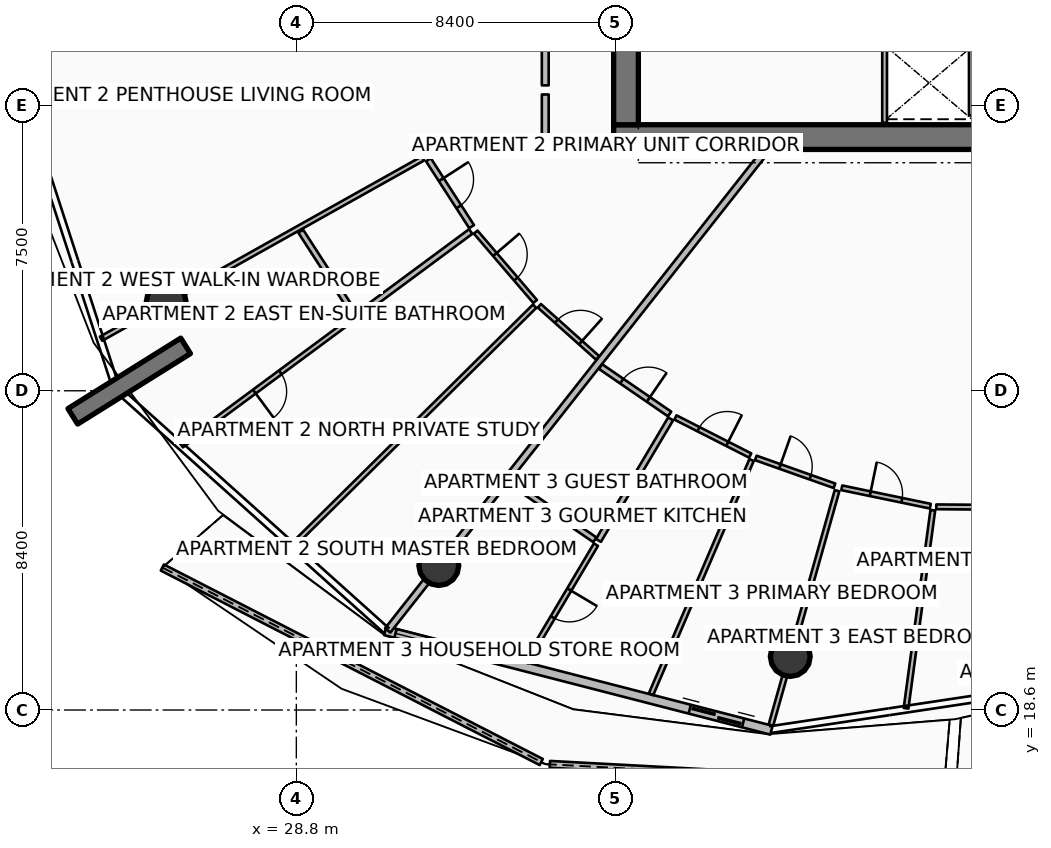
"""IFC4 building model, lengths in metres.
Left out: names, types, materials, properties, quantities, classifications, styles, units other than length and angle.
Written with IfcOpenShell. Run it as: python <this file> out.ifc"""

import sys

from ifc_helpers import new_model, si_unit, direction, frame, frame_2d, origin, origin_2d, place, context, subcontext, project, spatial, polyline, rectangle, circle, outline, extrude, element, fill, save


model = new_model("IFC4")
c1 = context("Model", 3, precision=1e-05, world=origin(), true_north=direction((0.0, 1.0)))
c2 = subcontext(c1, "Body", "Model", "MODEL_VIEW")
j1 = project(units=[si_unit("LENGTHUNIT", "METRE"), si_unit("PLANEANGLEUNIT", "RADIAN")], contexts=[c1])
p1 = place(None, origin())
s1 = spatial("IfcSite", under=j1, at=p1, CompositionType="ELEMENT")
p2 = place(p1, origin())
s2 = spatial("IfcBuilding", under=s1, at=p2, CompositionType="ELEMENT")
p3 = place(p2, frame((0.0, 0.0, 221.55)))
s3 = spatial("IfcBuildingStorey", under=s2, at=p3, CompositionType="ELEMENT", Elevation=221.55)
p4 = place(p3, frame((37.15, 33.675, 0.0), z_axis=(0.0, 0.0, 1.0), x_axis=(1.0, 0.0, 0.0)))
e1 = element("IfcWall", 1, at=p4, inside=s3, PredefinedType="SHEAR", context=c2, shape_type="SweptSolid", body=[
    extrude(rectangle(XDim=9.75, YDim=0.65, at=frame_2d((4.875, 0.0))), origin(), (0.0, 0.0, 1.0), 3.75),
])
p5 = place(p3, frame((37.475, 34.0, 0.0), z_axis=(0.0, 0.0, 1.0), x_axis=(0.0, 1.0, 0.0)))
e2 = element("IfcWall", 2, at=p5, inside=s3, PredefinedType="SHEAR", context=c2, shape_type="SweptSolid", body=[
    extrude(rectangle(XDim=16.0, YDim=0.65, at=frame_2d((8.0, 0.0))), origin(), (0.0, 0.0, 1.0), 3.75),
])
p6 = place(p3, frame((25.886, 28.182, 0.0), z_axis=(0.0, 0.0, 1.0), x_axis=(-0.848033572426, -0.529942506352, 0.0)))
e3 = element("IfcWall", 3, at=p6, inside=s3, PredefinedType="SOLIDWALL", context=c2, shape_type="SweptSolid", body=[
    extrude(rectangle(XDim=3.5, YDim=0.48, at=frame_2d((1.75, 0.0))), origin(), (0.0, 0.0, 1.0), 3.75),
])
p7 = place(p3, frame((25.375, 29.329, 0.0), z_axis=(-0.260291589726, -0.145725683619, 0.954469650356), x_axis=(0.488507395799, -0.872559753971, 0.0)))
e4 = element("IfcColumn", 4, at=p7, inside=s3, PredefinedType="COLUMN", context=c2, shape_type="SweptSolid", body=[
    extrude(circle(Radius=0.525, at=origin_2d()), origin(), (0.0, 0.0, 1.0), 3.635),
])
p8 = place(p3, frame((32.549, 22.401, 0.0), z_axis=(-0.178277097361, -0.226248863544, 0.957616169612), x_axis=(0.785457214564, -0.618915958826, 0.0)))
e5 = element("IfcColumn", 5, at=p8, inside=s3, PredefinedType="COLUMN", context=c2, shape_type="SweptSolid", body=[
    extrude(circle(Radius=0.525, at=origin_2d()), origin(), (0.0, 0.0, 1.0), 3.624),
])
p9 = place(p3, frame((41.798, 20.008, 0.0), z_axis=(-0.072038916576, -0.255527870756, 0.964114050186), x_axis=(0.962482190553, -0.271344859667, 0.0)))
e6 = element("IfcColumn", 6, at=p9, inside=s3, PredefinedType="COLUMN", context=c2, shape_type="SweptSolid", body=[
    extrude(circle(Radius=0.525, at=origin_2d()), origin(), (0.0, 0.0, 1.0), 3.599),
])
p10 = place(p3, frame((25.274, 22.349, 0.0), z_axis=(0.0, 0.0, 1.0), x_axis=(0.889659107665, -0.456625308266, 0.0)))
e7 = element("IfcWall", 7, at=p10, inside=s3, PredefinedType="PARAPET", context=c2, shape_type="SweptSolid", body=[
    extrude(outline(polyline([(0.0, 0.0), (11.208, 0.0), (11.208, 1.148), (5.604, 1.284), (0.0, 1.483), (0.0, 0.0)])), frame((0.0, 0.09, 0.0), z_axis=(0.0, -1.0, 0.0), x_axis=(1.0, 0.0, 0.0)), (0.0, 0.0, 1.0), 0.18),
])
p11 = place(p3, frame((35.472, 17.17, 0.0), z_axis=(0.0, 0.0, 1.0), x_axis=(0.998572477619, -0.053413546421, 0.0)))
e8 = element("IfcWall", 8, at=p11, inside=s3, PredefinedType="PARAPET", context=c2, shape_type="SweptSolid", body=[
    extrude(outline(polyline([(0.0, 0.0), (10.389, 0.0), (10.389, 1.224), (5.195, 1.127), (0.0, 1.148), (0.0, 0.0)])), frame((0.0, 0.09, 0.0), z_axis=(0.0, -1.0, 0.0), x_axis=(1.0, 0.0, 0.0)), (0.0, 0.0, 1.0), 0.18),
])
p12 = place(p3, frame((46.161, 16.649, 0.0), z_axis=(0.0, 0.0, 1.0), x_axis=(0.981918699124, 0.189303112259, 0.0)))
e9 = element("IfcWall", 9, at=p12, inside=s3, PredefinedType="PARAPET", context=c2, shape_type="SweptSolid", body=[
    extrude(outline(polyline([(0.0, 0.0), (9.537, 0.0), (9.537, 1.632), (4.769, 1.418), (0.0, 1.233), (0.0, 0.0)])), frame((0.0, 0.09, 0.0), z_axis=(0.0, -1.0, 0.0), x_axis=(1.0, 0.0, 0.0)), (0.0, 0.0, 1.0), 0.18),
])
p13 = place(p3, frame((31.14, 20.687, 0.0), z_axis=(0.0, 0.0, 1.0), x_axis=(0.968374028006, -0.249502989727, 0.0)))
e10 = element("IfcWall", 10, at=p13, inside=s3, PredefinedType="SOLIDWALL", context=c2, shape_type="SweptSolid", body=[
    extrude(rectangle(XDim=10.494, YDim=0.24, at=frame_2d((5.247, 0.0))), origin(), (0.0, 0.0, 1.0), 2.42),
])
p14 = place(p13, frame((8.274, 0.0, 0.0)))
e11 = element("IfcOpeningElement", 11, at=p14, cuts=e10, PredefinedType="OPENING", context=c2, shape_type="SweptSolid", body=[
    extrude(rectangle(XDim=1.45, YDim=2.15, at=frame_2d((0.725, 1.075))), frame((0.0, 0.13, 0.0), z_axis=(0.0, -1.0, 0.0), x_axis=(1.0, 0.0, 0.0)), (0.0, 0.0, 1.0), 0.26),
])
p15 = place(p13, frame((0.28, 0.0, 0.65)))
e12 = element("IfcOpeningElement", 12, at=p15, cuts=e10, PredefinedType="OPENING", context=c2, shape_type="SweptSolid", body=[
    extrude(rectangle(XDim=1.6, YDim=1.5, at=frame_2d((0.8, 0.75))), frame((0.0, 0.13, 0.0), z_axis=(0.0, -1.0, 0.0), x_axis=(1.0, 0.0, 0.0)), (0.0, 0.0, 1.0), 0.26),
])
p16 = place(p3, frame((46.58, 34.245, 0.0), z_axis=(0.0, 0.0, 1.0), x_axis=(0.0, 1.0, 0.0)))
e13 = element("IfcWall", 13, at=p16, inside=s3, PredefinedType="PARTITIONING", context=c2, shape_type="SweptSolid", body=[
    extrude(rectangle(XDim=1.71, YDim=0.16, at=frame_2d((0.855, 0.0))), origin(), (0.0, 0.0, 1.0), 3.47),
])
p17 = place(p3, frame((44.28, 34.05, 0.0), z_axis=(0.0, 0.0, 1.0), x_axis=(0.0, 1.0, 0.0)))
e14 = element("IfcWall", 14, at=p17, inside=s3, PredefinedType="PARTITIONING", context=c2, shape_type="SweptSolid", body=[
    extrude(rectangle(XDim=2.03, YDim=0.125, at=frame_2d((1.015, 0.0))), origin(), (0.0, 0.0, 1.0), 2.91),
])
p18 = place(p3, frame((41.113, 33.264, 0.0), z_axis=(0.0, 0.0, 1.0), x_axis=(-0.619089233189, -0.785320648748, 0.0)))
e15 = element("IfcWall", 15, at=p18, inside=s3, PredefinedType="PARTITIONING", context=c2, shape_type="SweptSolid", body=[
    extrude(rectangle(XDim=16.006, YDim=0.18, at=frame_2d((8.003, 0.0))), origin(), (0.0, 0.0, 1.0), 2.427),
])
p19 = place(p3, frame((35.35, 40.383, 0.0), z_axis=(0.0, 0.0, 1.0), x_axis=(0.0, -1.0, 0.0)))
e16 = element("IfcWall", 16, at=p19, inside=s3, PredefinedType="PARTITIONING", context=c2, shape_type="SweptSolid", body=[
    extrude(rectangle(XDim=5.347, YDim=0.18, at=frame_2d((2.674, 0.0))), origin(), (0.0, 0.0, 1.0), 2.427),
])
p20 = place(p19, frame((2.124, 0.0, 0.0)))
e17 = element("IfcOpeningElement", 17, at=p20, cuts=e16, PredefinedType="OPENING", context=c2, shape_type="SweptSolid", body=[
    extrude(rectangle(XDim=1.1, YDim=2.1, at=frame_2d((0.55, 1.05))), frame((0.0, 0.1, 0.0), z_axis=(0.0, -1.0, 0.0), x_axis=(1.0, 0.0, 0.0)), (0.0, 0.0, 1.0), 0.2),
])
p21 = place(p3, frame((35.35, 34.796, 0.0), z_axis=(0.0, 0.0, 1.0), x_axis=(0.0, -1.0, 0.0)))
e18 = element("IfcWall", 18, at=p21, inside=s3, PredefinedType="PARTITIONING", context=c2, shape_type="SweptSolid", body=[
    extrude(rectangle(XDim=1.326, YDim=0.18, at=frame_2d((0.663, 0.0))), origin(), (0.0, 0.0, 1.0), 2.427),
])
p22 = place(p3, frame((32.134, 33.115, 0.0), z_axis=(0.0, 0.0, 1.0), x_axis=(-0.872496583505, -0.488620212202, 0.0)))
e19 = element("IfcWall", 19, at=p22, inside=s3, PredefinedType="PARTITIONING", context=c2, shape_type="SweptSolid", body=[
    extrude(rectangle(XDim=9.71, YDim=0.125, at=frame_2d((4.855, 0.0))), origin(), (0.0, 0.0, 1.0), 2.427),
])
p23 = place(p3, frame((32.275, 33.079, 0.0), z_axis=(0.0, 0.0, 1.0), x_axis=(0.542840570976, -0.839835766387, 0.0)))
e20 = element("IfcWall", 20, at=p23, inside=s3, PredefinedType="PARTITIONING", context=c2, shape_type="SweptSolid", body=[
    extrude(rectangle(XDim=2.095, YDim=0.15, at=frame_2d((1.048, 0.0))), origin(), (0.0, 0.0, 1.0), 2.427),
])
p24 = place(p23, frame((0.623, 0.0, 0.0)))
e21 = element("IfcOpeningElement", 21, at=p24, cuts=e20, PredefinedType="OPENING", context=c2, shape_type="SweptSolid", body=[
    extrude(rectangle(XDim=0.85, YDim=2.06, at=frame_2d((0.425, 1.03))), frame((0.0, 0.085, 0.0), z_axis=(0.0, -1.0, 0.0), x_axis=(1.0, 0.0, 0.0)), (0.0, 0.0, 1.0), 0.17),
])
p25 = place(p3, frame((28.916, 31.198, 0.0), z_axis=(0.0, 0.0, 1.0), x_axis=(0.542815965197, -0.839851670194, 0.0)))
e22 = element("IfcWall", 22, at=p25, inside=s3, PredefinedType="PARTITIONING", context=c2, shape_type="SweptSolid", body=[
    extrude(rectangle(XDim=2.582, YDim=0.15, at=frame_2d((1.291, 0.0))), origin(), (0.0, 0.0, 1.0), 2.427),
])
p26 = place(p3, frame((33.389, 31.19, 0.0), z_axis=(0.0, 0.0, 1.0), x_axis=(-0.803881437267, -0.59478957188, 0.0)))
e23 = element("IfcWall", 23, at=p26, inside=s3, PredefinedType="PARTITIONING", context=c2, shape_type="SweptSolid", body=[
    extrude(rectangle(XDim=3.72, YDim=0.15, at=frame_2d((1.86, 0.0))), origin(), (0.0, 0.0, 1.0), 2.91),
])
p27 = place(p3, frame((30.294, 28.901, 0.0), z_axis=(0.0, 0.0, 1.0), x_axis=(-0.803900511417, -0.594763791554, 0.0)))
e24 = element("IfcWall", 24, at=p27, inside=s3, PredefinedType="PARTITIONING", context=c2, shape_type="SweptSolid", body=[
    extrude(rectangle(XDim=5.616, YDim=0.125, at=frame_2d((2.808, 0.0))), origin(), (0.0, 0.0, 1.0), 2.445),
])
p28 = place(p27, frame((2.383, 0.0, 0.0)))
e25 = element("IfcOpeningElement", 25, at=p28, cuts=e24, PredefinedType="OPENING", context=c2, shape_type="SweptSolid", body=[
    extrude(rectangle(XDim=0.85, YDim=2.06, at=frame_2d((0.425, 1.03))), frame((0.0, 0.073, 0.0), z_axis=(0.0, -1.0, 0.0), x_axis=(1.0, 0.0, 0.0)), (0.0, 0.0, 1.0), 0.145),
])
p29 = place(p3, frame((35.072, 29.226, 0.0), z_axis=(0.0, 0.0, 1.0), x_axis=(-0.711336156962, -0.702851955819, 0.0)))
e26 = element("IfcWall", 26, at=p29, inside=s3, PredefinedType="PARTITIONING", context=c2, shape_type="SweptSolid", body=[
    extrude(rectangle(XDim=8.949, YDim=0.125, at=frame_2d((4.475, 0.0))), origin(), (0.0, 0.0, 1.0), 2.445),
])
p30 = place(p3, frame((33.52, 31.176, 0.0), z_axis=(0.0, 0.0, 1.0), x_axis=(0.650465139948, -0.759536109551, 0.0)))
e27 = element("IfcWall", 27, at=p30, inside=s3, PredefinedType="PARTITIONING", context=c2, shape_type="SweptSolid", body=[
    extrude(rectangle(XDim=2.404, YDim=0.125, at=frame_2d((1.202, 0.0))), origin(), (0.0, 0.0, 1.0), 2.91),
])
p31 = place(p30, frame((0.777, 0.0, 0.0)))
e28 = element("IfcOpeningElement", 28, at=p31, cuts=e27, PredefinedType="OPENING", context=c2, shape_type="SweptSolid", body=[
    extrude(rectangle(XDim=0.85, YDim=2.06, at=frame_2d((0.425, 1.03))), frame((0.0, 0.073, 0.0), z_axis=(0.0, -1.0, 0.0), x_axis=(1.0, 0.0, 0.0)), (0.0, 0.0, 1.0), 0.145),
])
p32 = place(p3, frame((35.195, 29.236, 0.0), z_axis=(0.0, 0.0, 1.0), x_axis=(0.745455386239, -0.666555524414, 0.0)))
e29 = element("IfcWall", 29, at=p32, inside=s3, PredefinedType="PARTITIONING", context=c2, shape_type="SweptSolid", body=[
    extrude(rectangle(XDim=2.058, YDim=0.125, at=frame_2d((1.029, 0.0))), origin(), (0.0, 0.0, 1.0), 2.427),
])
p33 = place(p32, frame((0.604, 0.0, 0.0)))
e30 = element("IfcOpeningElement", 30, at=p33, cuts=e29, PredefinedType="OPENING", context=c2, shape_type="SweptSolid", body=[
    extrude(rectangle(XDim=0.85, YDim=2.06, at=frame_2d((0.425, 1.03))), frame((0.0, 0.073, 0.0), z_axis=(0.0, -1.0, 0.0), x_axis=(1.0, 0.0, 0.0)), (0.0, 0.0, 1.0), 0.145),
])
p34 = place(p3, frame((36.804, 27.637, 0.0), z_axis=(0.0, 0.0, 1.0), x_axis=(0.824339072275, -0.566096364518, 0.0)))
e31 = element("IfcWall", 31, at=p34, inside=s3, PredefinedType="PARTITIONING", context=c2, shape_type="SweptSolid", body=[
    extrude(rectangle(XDim=2.205, YDim=0.15, at=frame_2d((1.102, 0.0))), origin(), (0.0, 0.0, 1.0), 2.427),
])
p35 = place(p34, frame((0.677, 0.0, 0.0)))
e32 = element("IfcOpeningElement", 32, at=p35, cuts=e31, PredefinedType="OPENING", context=c2, shape_type="SweptSolid", body=[
    extrude(rectangle(XDim=0.85, YDim=2.06, at=frame_2d((0.425, 1.03))), frame((0.0, 0.085, 0.0), z_axis=(0.0, -1.0, 0.0), x_axis=(1.0, 0.0, 0.0)), (0.0, 0.0, 1.0), 0.17),
])
p36 = place(p3, frame((34.421, 24.614, 0.0), z_axis=(0.0, 0.0, 1.0), x_axis=(0.824322992765, -0.566119778491, 0.0)))
e33 = element("IfcWall", 33, at=p36, inside=s3, PredefinedType="PARTITIONING", context=c2, shape_type="SweptSolid", body=[
    extrude(rectangle(XDim=2.711, YDim=0.15, at=frame_2d((1.355, 0.0))), origin(), (0.0, 0.0, 1.0), 2.427),
])
p37 = place(p3, frame((38.65, 26.261, 0.0), z_axis=(0.0, 0.0, 1.0), x_axis=(-0.510726768545, -0.859743082491, 0.0)))
e34 = element("IfcWall", 34, at=p37, inside=s3, PredefinedType="PARTITIONING", context=c2, shape_type="SweptSolid", body=[
    extrude(rectangle(XDim=3.72, YDim=0.15, at=frame_2d((1.86, 0.0))), origin(), (0.0, 0.0, 1.0), 2.91),
])
p38 = place(p3, frame((36.684, 22.951, 0.0), z_axis=(0.0, 0.0, 1.0), x_axis=(-0.510700168426, -0.859758883623, 0.0)))
e35 = element("IfcWall", 35, at=p38, inside=s3, PredefinedType="PARTITIONING", context=c2, shape_type="SweptSolid", body=[
    extrude(rectangle(XDim=3.599, YDim=0.125, at=frame_2d((1.8, 0.0))), origin(), (0.0, 0.0, 1.0), 2.445),
])
p39 = place(p38, frame((1.375, 0.0, 0.0)))
e36 = element("IfcOpeningElement", 36, at=p39, cuts=e35, PredefinedType="OPENING", context=c2, shape_type="SweptSolid", body=[
    extrude(rectangle(XDim=0.85, YDim=2.06, at=frame_2d((0.425, 1.03))), frame((0.0, 0.073, 0.0), z_axis=(0.0, -1.0, 0.0), x_axis=(1.0, 0.0, 0.0)), (0.0, 0.0, 1.0), 0.145),
])
p40 = place(p3, frame((40.779, 25.177, 0.0), z_axis=(0.0, 0.0, 1.0), x_axis=(-0.394428741877, -0.918926530024, 0.0)))
e37 = element("IfcWall", 37, at=p40, inside=s3, PredefinedType="PARTITIONING", context=c2, shape_type="SweptSolid", body=[
    extrude(rectangle(XDim=6.708, YDim=0.125, at=frame_2d((3.354, 0.0))), origin(), (0.0, 0.0, 1.0), 2.445),
])
p41 = place(p3, frame((38.776, 26.297, 0.0), z_axis=(0.0, 0.0, 1.0), x_axis=(0.891241164498, -0.453529697709, 0.0)))
e38 = element("IfcWall", 38, at=p41, inside=s3, PredefinedType="PARTITIONING", context=c2, shape_type="SweptSolid", body=[
    extrude(rectangle(XDim=2.207, YDim=0.125, at=frame_2d((1.104, 0.0))), origin(), (0.0, 0.0, 1.0), 2.91),
])
p42 = place(p41, frame((0.678, 0.0, 0.0)))
e39 = element("IfcOpeningElement", 39, at=p42, cuts=e38, PredefinedType="OPENING", context=c2, shape_type="SweptSolid", body=[
    extrude(rectangle(XDim=0.85, YDim=2.06, at=frame_2d((0.425, 1.03))), frame((0.0, 0.073, 0.0), z_axis=(0.0, -1.0, 0.0), x_axis=(1.0, 0.0, 0.0)), (0.0, 0.0, 1.0), 0.145),
])
p43 = place(p3, frame((40.89, 25.233, 0.0), z_axis=(0.0, 0.0, 1.0), x_axis=(0.942710981839, -0.333610558467, 0.0)))
e40 = element("IfcWall", 40, at=p43, inside=s3, PredefinedType="PARTITIONING", context=c2, shape_type="SweptSolid", body=[
    extrude(rectangle(XDim=2.197, YDim=0.125, at=frame_2d((1.099, 0.0))), origin(), (0.0, 0.0, 1.0), 2.427),
])
p44 = place(p43, frame((0.674, 0.0, 0.0)))
e41 = element("IfcOpeningElement", 41, at=p44, cuts=e40, PredefinedType="OPENING", context=c2, shape_type="SweptSolid", body=[
    extrude(rectangle(XDim=0.85, YDim=2.06, at=frame_2d((0.425, 1.03))), frame((0.0, 0.073, 0.0), z_axis=(0.0, -1.0, 0.0), x_axis=(1.0, 0.0, 0.0)), (0.0, 0.0, 1.0), 0.145),
])
p45 = place(p3, frame((43.028, 24.371, 0.0), z_axis=(0.0, 0.0, 1.0), x_axis=(-0.271444786447, -0.962454013401, 0.0)))
e42 = element("IfcWall", 42, at=p45, inside=s3, PredefinedType="PARTITIONING", context=c2, shape_type="SweptSolid", body=[
    extrude(rectangle(XDim=6.41, YDim=0.125, at=frame_2d((3.205, 0.0))), origin(), (0.0, 0.0, 1.0), 2.427),
])
p46 = place(p3, frame((45.549, 23.858, 0.0), z_axis=(0.0, 0.0, 1.0), x_axis=(-0.13386615137, -0.990999421552, 0.0)))
e43 = element("IfcWall", 43, at=p46, inside=s3, PredefinedType="PARTITIONING", context=c2, shape_type="SweptSolid", body=[
    extrude(rectangle(XDim=5.26, YDim=0.125, at=frame_2d((2.63, 0.0))), origin(), (0.0, 0.0, 1.0), 2.445),
])
p47 = place(p3, frame((43.153, 24.447, 0.0), z_axis=(0.0, 0.0, 1.0), x_axis=(0.979138075321, -0.203196037012, 0.0)))
e44 = element("IfcWall", 44, at=p47, inside=s3, PredefinedType="PARTITIONING", context=c2, shape_type="SweptSolid", body=[
    extrude(rectangle(XDim=2.379, YDim=0.125, at=frame_2d((1.189, 0.0))), origin(), (0.0, 0.0, 1.0), 2.427),
])
p48 = place(p47, frame((0.764, 0.0, 0.0)))
e45 = element("IfcOpeningElement", 45, at=p48, cuts=e44, PredefinedType="OPENING", context=c2, shape_type="SweptSolid", body=[
    extrude(rectangle(XDim=0.85, YDim=2.06, at=frame_2d((0.425, 1.03))), frame((0.0, 0.073, 0.0), z_axis=(0.0, -1.0, 0.0), x_axis=(1.0, 0.0, 0.0)), (0.0, 0.0, 1.0), 0.145),
])
p49 = place(p3, frame((45.641, 23.946, 0.0), z_axis=(0.0, 0.0, 1.0), x_axis=(0.999966292936, -0.008210541545, 0.0)))
e46 = element("IfcWall", 46, at=p49, inside=s3, PredefinedType="PARTITIONING", context=c2, shape_type="SweptSolid", body=[
    extrude(rectangle(XDim=4.401, YDim=0.125, at=frame_2d((2.2, 0.0))), origin(), (0.0, 0.0, 1.0), 2.91),
])
p50 = place(p49, frame((1.75, 0.0, 0.0)))
e47 = element("IfcOpeningElement", 47, at=p50, cuts=e46, PredefinedType="OPENING", context=c2, shape_type="SweptSolid", body=[
    extrude(rectangle(XDim=0.9, YDim=2.08, at=frame_2d((0.45, 1.04))), frame((0.0, 0.073, 0.0), z_axis=(0.0, -1.0, 0.0), x_axis=(1.0, 0.0, 0.0)), (0.0, 0.0, 1.0), 0.145),
])
p51 = place(p14, origin())
e48 = element("IfcDoor", 48, at=p51, inside=s3, OperationType="DOUBLE_DOOR_SLIDING", PredefinedType="DOOR", context=c2, shape_type="SweptSolid", body=[
    extrude(rectangle(XDim=1.45, YDim=2.15, at=frame_2d((0.725, 1.075))), frame((0.0, 0.025, 0.0), z_axis=(0.0, -1.0, 0.0), x_axis=(1.0, 0.0, 0.0)), (0.0, 0.0, 1.0), 0.05),
])
fill(e11, e48)
p52 = place(p15, origin())
e49 = element("IfcWindow", 49, at=p52, inside=s3, PartitioningType="SINGLE_PANEL", PredefinedType="WINDOW", context=c2, shape_type="SweptSolid", body=[
    extrude(rectangle(XDim=1.6, YDim=1.5, at=frame_2d((0.8, 0.75))), frame((0.0, 0.03, 0.0), z_axis=(0.0, -1.0, 0.0), x_axis=(1.0, 0.0, 0.0)), (0.0, 0.0, 1.0), 0.06),
])
fill(e12, e49)
p53 = place(p24, origin())
e50 = element("IfcDoor", 50, at=p53, inside=s3, OperationType="SINGLE_SWING_LEFT", PredefinedType="DOOR", context=c2, shape_type="SweptSolid", body=[
    extrude(rectangle(XDim=0.85, YDim=2.06, at=frame_2d((0.425, 1.03))), frame((0.0, 0.025, 0.0), z_axis=(0.0, -1.0, 0.0), x_axis=(1.0, 0.0, 0.0)), (0.0, 0.0, 1.0), 0.05),
])
fill(e21, e50)
p54 = place(p28, origin())
e51 = element("IfcDoor", 51, at=p54, inside=s3, OperationType="SINGLE_SWING_RIGHT", PredefinedType="DOOR", context=c2, shape_type="SweptSolid", body=[
    extrude(rectangle(XDim=0.85, YDim=2.06, at=frame_2d((0.425, 1.03))), frame((0.0, 0.025, 0.0), z_axis=(0.0, -1.0, 0.0), x_axis=(1.0, 0.0, 0.0)), (0.0, 0.0, 1.0), 0.05),
])
fill(e25, e51)
p55 = place(p31, origin())
e52 = element("IfcDoor", 52, at=p55, inside=s3, OperationType="SINGLE_SWING_LEFT", PredefinedType="DOOR", context=c2, shape_type="SweptSolid", body=[
    extrude(rectangle(XDim=0.85, YDim=2.06, at=frame_2d((0.425, 1.03))), frame((0.0, 0.025, 0.0), z_axis=(0.0, -1.0, 0.0), x_axis=(1.0, 0.0, 0.0)), (0.0, 0.0, 1.0), 0.05),
])
fill(e28, e52)
p56 = place(p33, origin())
e53 = element("IfcDoor", 53, at=p56, inside=s3, OperationType="SINGLE_SWING_RIGHT", PredefinedType="DOOR", context=c2, shape_type="SweptSolid", body=[
    extrude(rectangle(XDim=0.85, YDim=2.06, at=frame_2d((0.425, 1.03))), frame((0.0, 0.025, 0.0), z_axis=(0.0, -1.0, 0.0), x_axis=(1.0, 0.0, 0.0)), (0.0, 0.0, 1.0), 0.05),
])
fill(e30, e53)
p57 = place(p35, origin())
e54 = element("IfcDoor", 54, at=p57, inside=s3, OperationType="SINGLE_SWING_RIGHT", PredefinedType="DOOR", context=c2, shape_type="SweptSolid", body=[
    extrude(rectangle(XDim=0.85, YDim=2.06, at=frame_2d((0.425, 1.03))), frame((0.0, 0.025, 0.0), z_axis=(0.0, -1.0, 0.0), x_axis=(1.0, 0.0, 0.0)), (0.0, 0.0, 1.0), 0.05),
])
fill(e32, e54)
p58 = place(p39, origin())
e55 = element("IfcDoor", 55, at=p58, inside=s3, OperationType="SINGLE_SWING_LEFT", PredefinedType="DOOR", context=c2, shape_type="SweptSolid", body=[
    extrude(rectangle(XDim=0.85, YDim=2.06, at=frame_2d((0.425, 1.03))), frame((0.0, 0.025, 0.0), z_axis=(0.0, -1.0, 0.0), x_axis=(1.0, 0.0, 0.0)), (0.0, 0.0, 1.0), 0.05),
])
fill(e36, e55)
p59 = place(p42, origin())
e56 = element("IfcDoor", 56, at=p59, inside=s3, OperationType="SINGLE_SWING_RIGHT", PredefinedType="DOOR", context=c2, shape_type="SweptSolid", body=[
    extrude(rectangle(XDim=0.85, YDim=2.06, at=frame_2d((0.425, 1.03))), frame((0.0, 0.025, 0.0), z_axis=(0.0, -1.0, 0.0), x_axis=(1.0, 0.0, 0.0)), (0.0, 0.0, 1.0), 0.05),
])
fill(e39, e56)
p60 = place(p44, origin())
e57 = element("IfcDoor", 57, at=p60, inside=s3, OperationType="SINGLE_SWING_LEFT", PredefinedType="DOOR", context=c2, shape_type="SweptSolid", body=[
    extrude(rectangle(XDim=0.85, YDim=2.06, at=frame_2d((0.425, 1.03))), frame((0.0, 0.025, 0.0), z_axis=(0.0, -1.0, 0.0), x_axis=(1.0, 0.0, 0.0)), (0.0, 0.0, 1.0), 0.05),
])
fill(e41, e57)
p61 = place(p48, origin())
e58 = element("IfcDoor", 58, at=p61, inside=s3, OperationType="SINGLE_SWING_LEFT", PredefinedType="DOOR", context=c2, shape_type="SweptSolid", body=[
    extrude(rectangle(XDim=0.85, YDim=2.06, at=frame_2d((0.425, 1.03))), frame((0.0, 0.025, 0.0), z_axis=(0.0, -1.0, 0.0), x_axis=(1.0, 0.0, 0.0)), (0.0, 0.0, 1.0), 0.05),
])
fill(e45, e58)
save(model, sys.argv[1])
